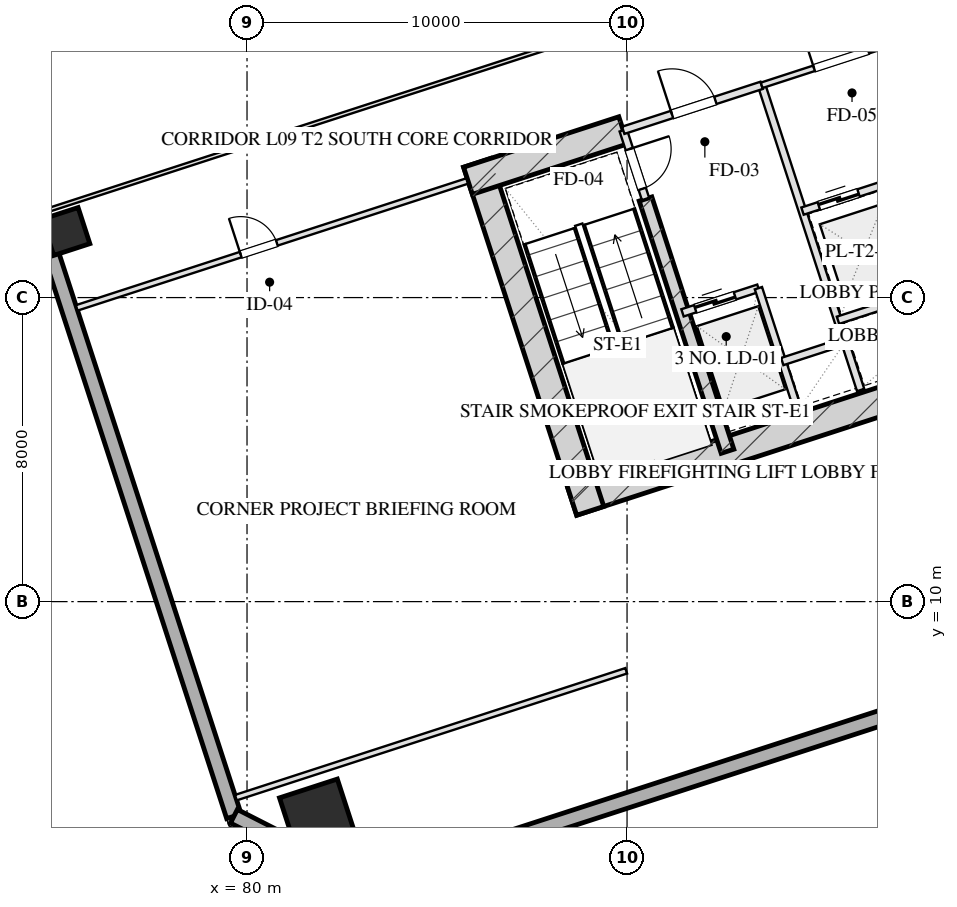
"""IFC4 building model, lengths in metres.
Left out: names, types, materials, properties, quantities, classifications, styles, units other than length and angle.
Written with IfcOpenShell. Run it as: python <this file> out.ifc"""

import sys

from ifc_helpers import new_model, si_unit, direction, frame, frame_2d, origin, origin_2d, place, context, subcontext, project, spatial, rectangle, hollow_rectangle, extrude, element, fill, save


model = new_model("IFC4")
c1 = context("Model", 3, precision=1e-05, world=origin(), true_north=direction((0.0, 1.0)))
c2 = subcontext(c1, "Body", "Model", "MODEL_VIEW")
j1 = project(units=[si_unit("LENGTHUNIT", "METRE"), si_unit("PLANEANGLEUNIT", "RADIAN")], contexts=[c1])
p1 = place(None, origin())
s1 = spatial("IfcSite", under=j1, at=p1, CompositionType="ELEMENT")
p2 = place(p1, origin())
s2 = spatial("IfcBuilding", under=s1, at=p2, CompositionType="ELEMENT")
p3 = place(p2, frame((0.0, 0.0, 42.0)))
s3 = spatial("IfcBuildingStorey", under=s2, at=p3, CompositionType="ELEMENT", Elevation=42.0)
p4 = place(p3, frame((88.559, 12.629, 0.0), z_axis=(0.0, 0.0, 1.0), x_axis=(0.951056072937, 0.309018358888, 0.0)))
e1 = element("IfcWall", 1, at=p4, inside=s3, PredefinedType="SHEAR", context=c2, shape_type="SweptSolid", body=[
    extrude(rectangle(XDim=16.55, YDim=0.75, at=frame_2d((8.275, 0.0))), origin(), (0.0, 0.0, 1.0), 4.0),
])
p5 = place(p3, frame((86.055, 21.546, 0.0), z_axis=(0.0, 0.0, 1.0), x_axis=(0.309023585745, -0.951054374604, 0.0)))
e2 = element("IfcWall", 2, at=p5, inside=s3, PredefinedType="SHEAR", context=c2, shape_type="SweptSolid", body=[
    extrude(rectangle(XDim=9.63, YDim=0.75, at=frame_2d((4.815, 0.0))), origin(), (0.0, 0.0, 1.0), 4.0),
])
p6 = place(p3, frame((90.486, 20.594, 0.0), z_axis=(0.0, 0.0, 1.0), x_axis=(0.309020428229, -0.951055400562, 0.0)))
e3 = element("IfcWall", 3, at=p6, inside=s3, PredefinedType="SHEAR", context=c2, shape_type="SweptSolid", body=[
    extrude(rectangle(XDim=6.98, YDim=0.35, at=frame_2d((3.49, 0.0))), origin(), (0.0, 0.0, 1.0), 4.0),
])
p7 = place(p3, frame((85.814, 21.074, 0.0), z_axis=(0.0, 0.0, 1.0), x_axis=(0.95106580992, 0.308988390074, 0.0)))
e4 = element("IfcWall", 4, at=p7, inside=s3, PredefinedType="SHEAR", context=c2, shape_type="SweptSolid", body=[
    extrude(rectangle(XDim=4.295, YDim=0.75, at=frame_2d((2.147, 0.0))), origin(), (0.0, 0.0, 1.0), 4.0),
])
p8 = place(p3, frame((81.863, 4.323, 0.0), z_axis=(0.0, 0.0, 1.0), x_axis=(0.951056516295, 0.309016994375, 0.0)))
e5 = element("IfcColumn", 5, at=p8, inside=s3, PredefinedType="COLUMN", context=c2, shape_type="SweptSolid", body=[
    extrude(hollow_rectangle(XDim=1.6, YDim=1.6, WallThickness=0.055, at=origin_2d()), origin(), (0.0, 0.0, 1.0), 4.001),
])
p9 = place(p3, frame((75.234, 19.739, 0.0), z_axis=(0.0, 0.0, 1.0), x_axis=(0.951056516295, 0.309016994375, 0.0)))
e6 = element("IfcColumn", 6, at=p9, inside=s3, PredefinedType="COLUMN", context=c2, shape_type="SweptSolid", body=[
    extrude(hollow_rectangle(XDim=1.0, YDim=1.0, WallThickness=0.036, at=origin_2d()), origin(), (0.0, 0.0, 1.0), 4.001),
])
p10 = place(p3, frame((79.655, 4.352, 0.0), z_axis=(0.0, 0.0, 1.0), x_axis=(-0.309014526607, 0.951057318118, 0.0)))
e7 = element("IfcWall", 7, at=p10, inside=s3, PredefinedType="SOLIDWALL", context=c2, shape_type="SweptSolid", body=[
    extrude(rectangle(XDim=50.0, YDim=0.4, at=frame_2d((25.0, 0.0))), origin(), (0.0, 0.0, 1.0), 3.1),
])
p11 = place(p3, frame((113.998, 12.567, 0.0), z_axis=(0.0, 0.0, 1.0), x_axis=(-0.951055939317, -0.309018770125, 0.0)))
e8 = element("IfcWall", 8, at=p11, inside=s3, PredefinedType="SOLIDWALL", context=c2, shape_type="SweptSolid", body=[
    extrude(rectangle(XDim=32.4, YDim=0.4, at=frame_2d((16.2, 0.0))), origin(), (0.0, 0.0, 1.0), 3.1),
])
p12 = place(p3, frame((83.184, 2.554, 0.0), z_axis=(0.0, 0.0, 1.0), x_axis=(-0.890998089617, 0.454007053137, 0.0)))
e9 = element("IfcWall", 9, at=p12, inside=s3, PredefinedType="SOLIDWALL", context=c2, shape_type="SweptSolid", body=[
    extrude(rectangle(XDim=3.96, YDim=0.4, at=frame_2d((1.98, 0.0))), origin(), (0.0, 0.0, 1.0), 3.1),
])
p13 = place(p3, frame((89.899, 22.401, 0.0), z_axis=(0.0, 0.0, 1.0), x_axis=(0.308932062672, -0.951084108086, 0.0)))
e10 = element("IfcWall", 10, at=p13, inside=s3, PredefinedType="PARTITIONING", context=c2, shape_type="SweptSolid", body=[
    extrude(rectangle(XDim=1.9, YDim=0.2, at=frame_2d((0.95, 0.0))), origin(), (0.0, 0.0, 1.0), 3.705),
])
p14 = place(p13, frame((0.52, 0.0, 0.0)))
e11 = element("IfcOpeningElement", 11, at=p14, cuts=e10, PredefinedType="OPENING", context=c2, shape_type="SweptSolid", body=[
    extrude(rectangle(XDim=1.1, YDim=2.05, at=frame_2d((0.55, 1.025))), frame((0.0, 0.11, 0.0), z_axis=(0.0, -1.0, 0.0), x_axis=(1.0, 0.0, 0.0)), (0.0, 0.0, 1.0), 0.22),
])
p15 = place(p3, frame((93.542, 23.585, 0.0), z_axis=(0.0, 0.0, 1.0), x_axis=(0.309042196757, -0.951048327176, 0.0)))
e12 = element("IfcWall", 12, at=p15, inside=s3, PredefinedType="PARTITIONING", context=c2, shape_type="SweptSolid", body=[
    extrude(rectangle(XDim=8.43, YDim=0.2, at=frame_2d((4.215, 0.0))), origin(), (0.0, 0.0, 1.0), 3.705),
])
p16 = place(p3, frame((89.899, 22.401, 0.0), z_axis=(0.0, 0.0, 1.0), x_axis=(0.951046716504, 0.309047153403, 0.0)))
e13 = element("IfcWall", 13, at=p16, inside=s3, PredefinedType="PARTITIONING", context=c2, shape_type="SweptSolid", body=[
    extrude(rectangle(XDim=3.83, YDim=0.2, at=frame_2d((1.915, 0.0))), origin(), (0.0, 0.0, 1.0), 3.705),
])
p17 = place(p16, frame((1.35, 0.0, 0.0)))
e14 = element("IfcOpeningElement", 14, at=p17, cuts=e13, PredefinedType="OPENING", context=c2, shape_type="SweptSolid", body=[
    extrude(rectangle(XDim=1.2, YDim=2.05, at=frame_2d((0.6, 1.025))), frame((0.0, 0.11, 0.0), z_axis=(0.0, -1.0, 0.0), x_axis=(1.0, 0.0, 0.0)), (0.0, 0.0, 1.0), 0.22),
])
p18 = place(p3, frame((91.46, 17.598, 0.0), z_axis=(0.0, 0.0, 1.0), x_axis=(0.951062257173, 0.308999325213, 0.0)))
e15 = element("IfcWall", 15, at=p18, inside=s3, PredefinedType="PARTITIONING", context=c2, shape_type="SweptSolid", body=[
    extrude(rectangle(XDim=2.1, YDim=0.2, at=frame_2d((1.05, 0.0))), origin(), (0.0, 0.0, 1.0), 3.705),
])
p19 = place(p18, frame((0.35, 0.0, 0.0)))
e16 = element("IfcOpeningElement", 16, at=p19, cuts=e15, PredefinedType="OPENING", context=c2, shape_type="SweptSolid", body=[
    extrude(rectangle(XDim=1.1, YDim=2.05, at=frame_2d((0.55, 1.025))), frame((0.0, 0.11, 0.0), z_axis=(0.0, -1.0, 0.0), x_axis=(1.0, 0.0, 0.0)), (0.0, 0.0, 1.0), 0.22),
])
p20 = place(p3, frame((93.457, 18.247, 0.0), z_axis=(0.0, 0.0, 1.0), x_axis=(0.3089935693, -0.951064127245, 0.0)))
e17 = element("IfcWall", 17, at=p20, inside=s3, PredefinedType="PARTITIONING", context=c2, shape_type="SweptSolid", body=[
    extrude(rectangle(XDim=3.7, YDim=0.2, at=frame_2d((1.85, 0.0))), origin(), (0.0, 0.0, 1.0), 3.705),
])
p21 = place(p3, frame((94.084, 16.317, 0.0), z_axis=(0.0, 0.0, 1.0), x_axis=(0.951041328149, 0.309063734775, 0.0)))
e18 = element("IfcWall", 18, at=p21, inside=s3, PredefinedType="PARTITIONING", context=c2, shape_type="SweptSolid", body=[
    extrude(rectangle(XDim=1.73, YDim=0.2, at=frame_2d((0.865, 0.0))), origin(), (0.0, 0.0, 1.0), 3.705),
])
p22 = place(p3, frame((93.542, 23.585, 0.0), z_axis=(0.0, 0.0, 1.0), x_axis=(0.951063829732, 0.308994485023, 0.0)))
e19 = element("IfcWall", 19, at=p22, inside=s3, PredefinedType="PARTITIONING", context=c2, shape_type="SweptSolid", body=[
    extrude(rectangle(XDim=4.4, YDim=0.15, at=frame_2d((2.2, 0.0))), origin(), (0.0, 0.0, 1.0), 3.705),
])
p23 = place(p22, frame((1.45, 0.0, 0.0)))
e20 = element("IfcOpeningElement", 20, at=p23, cuts=e19, PredefinedType="OPENING", context=c2, shape_type="SweptSolid", body=[
    extrude(rectangle(XDim=1.5, YDim=2.05, at=frame_2d((0.75, 1.025))), frame((0.0, 0.085, 0.0), z_axis=(0.0, -1.0, 0.0), x_axis=(1.0, 0.0, 0.0)), (0.0, 0.0, 1.0), 0.17),
])
p24 = place(p3, frame((94.617, 20.275, 0.0), z_axis=(0.0, 0.0, 1.0), x_axis=(0.951058531764, 0.30901079133, 0.0)))
e21 = element("IfcWall", 21, at=p24, inside=s3, PredefinedType="PARTITIONING", context=c2, shape_type="SweptSolid", body=[
    extrude(rectangle(XDim=4.4, YDim=0.2, at=frame_2d((2.2, 0.0))), origin(), (0.0, 0.0, 1.0), 3.705),
])
p25 = place(p24, frame((0.45, 0.0, 0.0)))
e22 = element("IfcOpeningElement", 22, at=p25, cuts=e21, PredefinedType="OPENING", context=c2, shape_type="SweptSolid", body=[
    extrude(rectangle(XDim=1.1, YDim=2.05, at=frame_2d((0.55, 1.025))), frame((0.0, 0.11, 0.0), z_axis=(0.0, -1.0, 0.0), x_axis=(1.0, 0.0, 0.0)), (0.0, 0.0, 1.0), 0.22),
])
p26 = place(p24, frame((2.55, 0.0, 0.0)))
e23 = element("IfcOpeningElement", 23, at=p26, cuts=e21, PredefinedType="OPENING", context=c2, shape_type="SweptSolid", body=[
    extrude(rectangle(XDim=1.1, YDim=2.05, at=frame_2d((0.55, 1.025))), frame((0.0, 0.11, 0.0), z_axis=(0.0, -1.0, 0.0), x_axis=(1.0, 0.0, 0.0)), (0.0, 0.0, 1.0), 0.22),
])
p27 = place(p3, frame((95.551, 17.403, 0.0), z_axis=(0.0, 0.0, 1.0), x_axis=(0.951058531764, 0.30901079133, 0.0)))
e24 = element("IfcWall", 24, at=p27, inside=s3, PredefinedType="PARTITIONING", context=c2, shape_type="SweptSolid", body=[
    extrude(rectangle(XDim=4.4, YDim=0.2, at=frame_2d((2.2, 0.0))), origin(), (0.0, 0.0, 1.0), 3.705),
])
p28 = place(p3, frame((79.707, 4.842, 0.0), z_axis=(0.0, 0.0, 1.0), x_axis=(0.951056658866, 0.309016555588, 0.0)))
e25 = element("IfcWall", 25, at=p28, inside=s3, PredefinedType="PARTITIONING", context=c2, shape_type="SweptSolid", body=[
    extrude(rectangle(XDim=10.8, YDim=0.15, at=frame_2d((5.4, 0.0))), origin(), (0.0, 0.0, 1.0), 3.705),
])
p29 = place(p3, frame((75.519, 17.729, 0.0), z_axis=(0.0, 0.0, 1.0), x_axis=(0.951056658866, 0.309016555588, 0.0)))
e26 = element("IfcWall", 26, at=p29, inside=s3, PredefinedType="PARTITIONING", context=c2, shape_type="SweptSolid", body=[
    extrude(rectangle(XDim=10.8, YDim=0.15, at=frame_2d((5.4, 0.0))), origin(), (0.0, 0.0, 1.0), 3.705),
])
p30 = place(p29, frame((4.536, 0.0, 0.0)))
e27 = element("IfcOpeningElement", 27, at=p30, cuts=e26, PredefinedType="OPENING", context=c2, shape_type="SweptSolid", body=[
    extrude(rectangle(XDim=1.0, YDim=2.05, at=frame_2d((0.5, 1.025))), frame((0.0, 0.085, 0.0), z_axis=(0.0, -1.0, 0.0), x_axis=(1.0, 0.0, 0.0)), (0.0, 0.0, 1.0), 0.17),
])
p31 = place(p3, frame((74.691, 20.278, 0.0), z_axis=(0.0, 0.0, 1.0), x_axis=(0.951053521786, 0.309026210375, 0.0)))
e28 = element("IfcWall", 28, at=p31, inside=s3, PredefinedType="MOVABLE", context=c2, shape_type="SweptSolid", body=[
    extrude(rectangle(XDim=18.075, YDim=0.1, at=frame_2d((9.038, 0.0))), origin(), (0.0, 0.0, 1.0), 3.705),
])
p32 = place(p3, frame((73.356, 24.386, 0.0), z_axis=(0.0, 0.0, 1.0), x_axis=(0.951057491432, 0.309013993197, 0.0)))
e29 = element("IfcWall", 29, at=p32, inside=s3, PredefinedType="MOVABLE", context=c2, shape_type="SweptSolid", body=[
    extrude(rectangle(XDim=18.075, YDim=0.1, at=frame_2d((9.038, 0.0))), origin(), (0.0, 0.0, 1.0), 3.705),
])
p33 = place(p14, origin())
e30 = element("IfcDoor", 30, at=p33, inside=s3, OperationType="SINGLE_SWING_LEFT", PredefinedType="DOOR", context=c2, shape_type="SweptSolid", body=[
    extrude(rectangle(XDim=1.1, YDim=2.05, at=frame_2d((0.55, 1.025))), frame((0.0, 0.025, 0.0), z_axis=(0.0, -1.0, 0.0), x_axis=(1.0, 0.0, 0.0)), (0.0, 0.0, 1.0), 0.05),
])
fill(e11, e30)
p34 = place(p17, origin())
e31 = element("IfcDoor", 31, at=p34, inside=s3, OperationType="SINGLE_SWING_LEFT", PredefinedType="DOOR", context=c2, shape_type="SweptSolid", body=[
    extrude(rectangle(XDim=1.2, YDim=2.05, at=frame_2d((0.6, 1.025))), frame((0.0, 0.025, 0.0), z_axis=(0.0, -1.0, 0.0), x_axis=(1.0, 0.0, 0.0)), (0.0, 0.0, 1.0), 0.05),
])
fill(e14, e31)
p35 = place(p19, origin())
e32 = element("IfcDoor", 32, at=p35, inside=s3, OperationType="DOUBLE_DOOR_SLIDING", PredefinedType="DOOR", context=c2, shape_type="SweptSolid", body=[
    extrude(rectangle(XDim=1.1, YDim=2.05, at=frame_2d((0.55, 1.025))), frame((0.0, 0.025, 0.0), z_axis=(0.0, -1.0, 0.0), x_axis=(1.0, 0.0, 0.0)), (0.0, 0.0, 1.0), 0.05),
])
fill(e16, e32)
p36 = place(p23, origin())
e33 = element("IfcDoor", 33, at=p36, inside=s3, OperationType="SINGLE_SWING_LEFT", PredefinedType="DOOR", context=c2, shape_type="SweptSolid", body=[
    extrude(rectangle(XDim=1.5, YDim=2.05, at=frame_2d((0.75, 1.025))), frame((0.0, 0.025, 0.0), z_axis=(0.0, -1.0, 0.0), x_axis=(1.0, 0.0, 0.0)), (0.0, 0.0, 1.0), 0.05),
])
fill(e20, e33)
p37 = place(p25, origin())
e34 = element("IfcDoor", 34, at=p37, inside=s3, OperationType="DOUBLE_DOOR_SLIDING", PredefinedType="DOOR", context=c2, shape_type="SweptSolid", body=[
    extrude(rectangle(XDim=1.1, YDim=2.05, at=frame_2d((0.55, 1.025))), frame((0.0, 0.025, 0.0), z_axis=(0.0, -1.0, 0.0), x_axis=(1.0, 0.0, 0.0)), (0.0, 0.0, 1.0), 0.05),
])
fill(e22, e34)
p38 = place(p30, origin())
e35 = element("IfcDoor", 35, at=p38, inside=s3, OperationType="SINGLE_SWING_LEFT", PredefinedType="DOOR", context=c2, shape_type="SweptSolid", body=[
    extrude(rectangle(XDim=1.0, YDim=2.05, at=frame_2d((0.5, 1.025))), frame((0.0, 0.025, 0.0), z_axis=(0.0, -1.0, 0.0), x_axis=(1.0, 0.0, 0.0)), (0.0, 0.0, 1.0), 0.05),
])
fill(e27, e35)
save(model, sys.argv[1])
